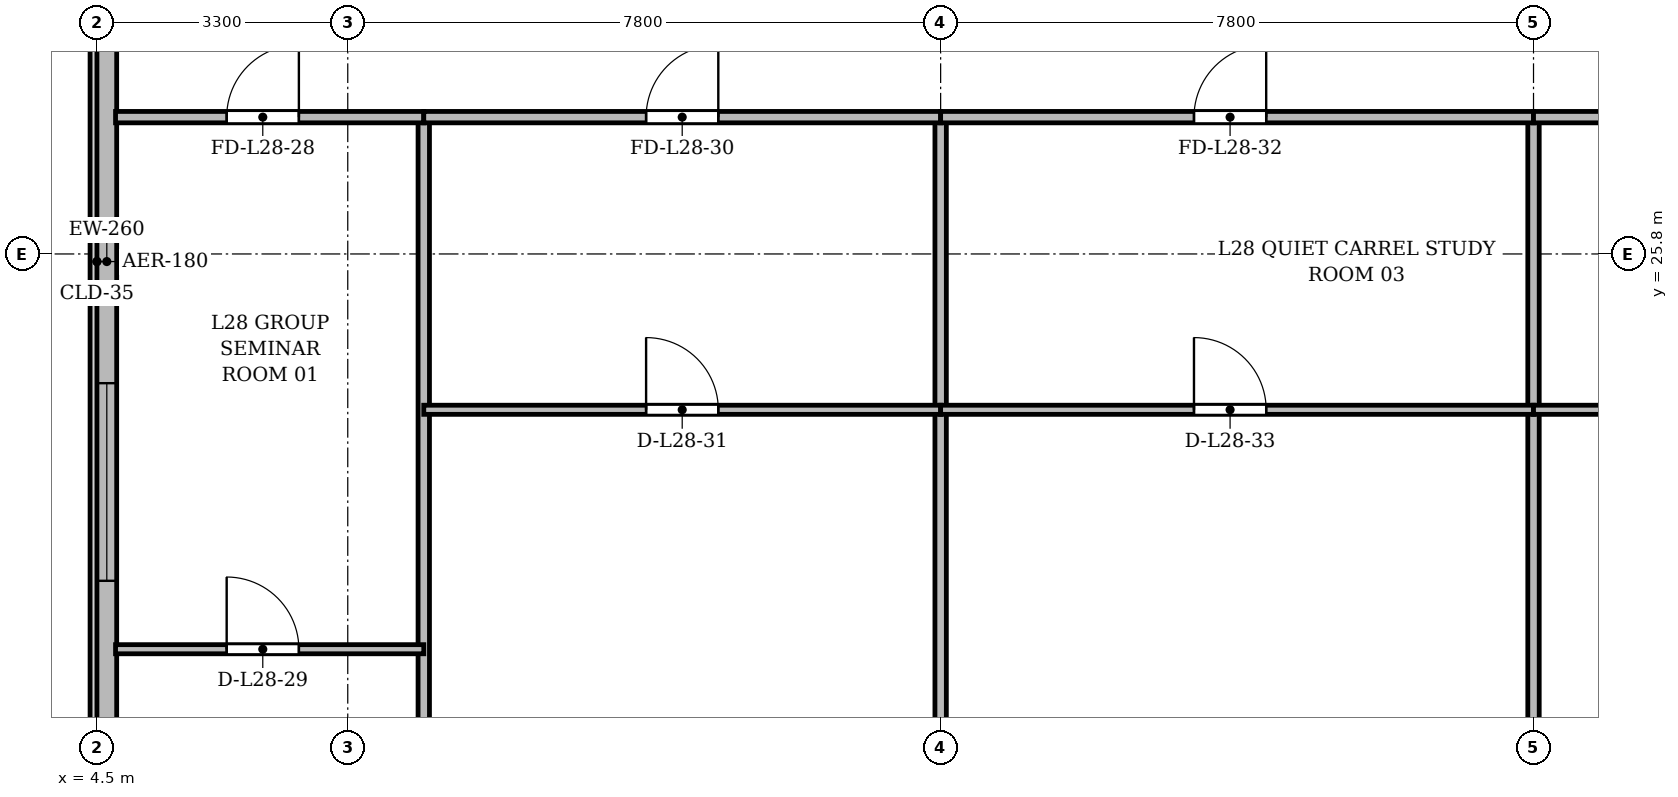
"""IFC4 building model, lengths in metres.
Left out: names, types, materials, properties, quantities, classifications, styles, units other than length and angle.
Written with IfcOpenShell. Run it as: python <this file> out.ifc"""

import sys

from ifc_helpers import new_model, si_unit, direction, frame, frame_2d, origin, place, context, subcontext, project, spatial, rectangle, extrude, source, transform, mapped, element, fill, save


model = new_model("IFC4")
c1 = context("Model", 3, precision=1e-05, world=origin(), true_north=direction((0.0, 1.0)))
c2 = subcontext(c1, "Body", "Model", "MODEL_VIEW")
j1 = project(units=[si_unit("LENGTHUNIT", "METRE"), si_unit("PLANEANGLEUNIT", "RADIAN")], contexts=[c1])
p1 = place(None, origin())
s1 = spatial("IfcSite", under=j1, at=p1, CompositionType="ELEMENT")
p2 = place(p1, origin())
s2 = spatial("IfcBuilding", under=s1, at=p2, CompositionType="ELEMENT")
p3 = place(p2, frame((0.0, 0.0, 110.5)))
s3 = spatial("IfcBuildingStorey", under=s2, at=p3, CompositionType="ELEMENT", Elevation=110.5)
p4 = place(p3, frame((4.63, 5.9, 0.0), z_axis=(0.0, 0.0, 1.0), x_axis=(0.0, 1.0, 0.0)))
e1 = element("IfcWall", 1, at=p4, inside=s3, PredefinedType="SOLIDWALL", context=c2, shape_type="SweptSolid", body=[
    extrude(rectangle(XDim=39.6, YDim=0.26, at=frame_2d((19.8, 0.0))), origin(), (0.0, 0.0, 1.0), 3.34),
])
p5 = place(p4, frame((1.45, 0.0, 0.92)))
e2 = element("IfcOpeningElement", 2, at=p5, cuts=e1, PredefinedType="OPENING", context=c2, shape_type="SweptSolid", body=[
    extrude(rectangle(XDim=1.2, YDim=1.65, at=frame_2d((0.6, 0.825))), frame((0.0, 0.14, 0.0), z_axis=(0.0, -1.0, 0.0), x_axis=(1.0, 0.0, 0.0)), (0.0, 0.0, 1.0), 0.28),
])
p6 = place(p4, frame((4.2, 0.0, 0.92)))
e3 = element("IfcOpeningElement", 3, at=p6, cuts=e1, PredefinedType="OPENING", context=c2, shape_type="SweptSolid", body=[
    extrude(rectangle(XDim=2.6, YDim=1.9, at=frame_2d((1.3, 0.95))), frame((0.0, 0.14, 0.0), z_axis=(0.0, -1.0, 0.0), x_axis=(1.0, 0.0, 0.0)), (0.0, 0.0, 1.0), 0.28),
])
p7 = place(p4, frame((8.4, 0.0, 0.92)))
e4 = element("IfcOpeningElement", 4, at=p7, cuts=e1, PredefinedType="OPENING", context=c2, shape_type="SweptSolid", body=[
    extrude(rectangle(XDim=2.6, YDim=1.9, at=frame_2d((1.3, 0.95))), frame((0.0, 0.14, 0.0), z_axis=(0.0, -1.0, 0.0), x_axis=(1.0, 0.0, 0.0)), (0.0, 0.0, 1.0), 0.28),
])
p8 = place(p4, frame((15.6, 0.0, 0.92)))
e5 = element("IfcOpeningElement", 5, at=p8, cuts=e1, PredefinedType="OPENING", context=c2, shape_type="SweptSolid", body=[
    extrude(rectangle(XDim=2.6, YDim=1.9, at=frame_2d((1.3, 0.95))), frame((0.0, 0.14, 0.0), z_axis=(0.0, -1.0, 0.0), x_axis=(1.0, 0.0, 0.0)), (0.0, 0.0, 1.0), 0.28),
])
p9 = place(p4, frame((29.6, 0.0, 0.92)))
e6 = element("IfcOpeningElement", 6, at=p9, cuts=e1, PredefinedType="OPENING", context=c2, shape_type="SweptSolid", body=[
    extrude(rectangle(XDim=2.6, YDim=1.9, at=frame_2d((1.3, 0.95))), frame((0.0, 0.14, 0.0), z_axis=(0.0, -1.0, 0.0), x_axis=(1.0, 0.0, 0.0)), (0.0, 0.0, 1.0), 0.28),
])
p10 = place(p4, frame((33.9, 0.0, 0.92)))
e7 = element("IfcOpeningElement", 7, at=p10, cuts=e1, PredefinedType="OPENING", context=c2, shape_type="SweptSolid", body=[
    extrude(rectangle(XDim=1.2, YDim=1.65, at=frame_2d((0.6, 0.825))), frame((0.0, 0.14, 0.0), z_axis=(0.0, -1.0, 0.0), x_axis=(1.0, 0.0, 0.0)), (0.0, 0.0, 1.0), 0.28),
])
p11 = place(p4, frame((37.25, 0.0, 0.92)))
e8 = element("IfcOpeningElement", 8, at=p11, cuts=e1, PredefinedType="OPENING", context=c2, shape_type="SweptSolid", body=[
    extrude(rectangle(XDim=1.2, YDim=1.65, at=frame_2d((0.6, 0.825))), frame((0.0, 0.14, 0.0), z_axis=(0.0, -1.0, 0.0), x_axis=(1.0, 0.0, 0.0)), (0.0, 0.0, 1.0), 0.28),
])
for number, where, z_axis, x_axis in (
    (9, (8.8, 3.145, 0.0), (0.0, 0.0, 1.0), (0.0, 1.0, 0.0)),
    (10, (15.6, 3.145, 0.0), (0.0, 0.0, 1.0), (0.0, 1.0, 0.0)),
    (11, (23.4, 3.145, 0.0), (0.0, 0.0, 1.0), (0.0, 1.0, 0.0)),
):
    element("IfcWall", number, at=place(p3, frame(where, z_axis=z_axis, x_axis=x_axis)), inside=s3, PredefinedType="PARTITIONING", context=c2, shape_type="SweptSolid", body=[
        extrude(rectangle(XDim=24.455, YDim=0.15, at=frame_2d((12.228, 0.0))), origin(), (0.0, 0.0, 1.0), 2.84),
    ])
p12 = place(p3, frame((4.745, 27.6, 0.0), z_axis=(0.0, 0.0, 1.0), x_axis=(1.0, 0.0, 0.0)))
e12 = element("IfcWall", 12, at=p12, inside=s3, PredefinedType="PARTITIONING", context=c2, shape_type="SweptSolid", body=[
    extrude(rectangle(XDim=4.055, YDim=0.15, at=frame_2d((2.027, 0.0))), origin(), (0.0, 0.0, 1.0), 2.84),
])
p13 = place(p12, frame((1.462, 0.0, 0.0)))
e13 = element("IfcOpeningElement", 13, at=p13, cuts=e12, PredefinedType="OPENING", context=c2, shape_type="SweptSolid", body=[
    extrude(rectangle(XDim=0.95, YDim=2.15, at=frame_2d((0.475, 1.075))), frame((0.0, 0.085, 0.0), z_axis=(0.0, -1.0, 0.0), x_axis=(1.0, 0.0, 0.0)), (0.0, 0.0, 1.0), 0.17),
])
p14 = place(p3, frame((4.745, 20.6, 0.0), z_axis=(0.0, 0.0, 1.0), x_axis=(1.0, 0.0, 0.0)))
e14 = element("IfcWall", 14, at=p14, inside=s3, PredefinedType="PARTITIONING", context=c2, shape_type="SweptSolid", body=[
    extrude(rectangle(XDim=4.055, YDim=0.12, at=frame_2d((2.027, 0.0))), origin(), (0.0, 0.0, 1.0), 2.84),
])
p15 = place(p14, frame((1.462, 0.0, 0.0)))
e15 = element("IfcOpeningElement", 15, at=p15, cuts=e14, PredefinedType="OPENING", context=c2, shape_type="SweptSolid", body=[
    extrude(rectangle(XDim=0.95, YDim=2.15, at=frame_2d((0.475, 1.075))), frame((0.0, 0.07, 0.0), z_axis=(0.0, -1.0, 0.0), x_axis=(1.0, 0.0, 0.0)), (0.0, 0.0, 1.0), 0.14),
])
p16 = place(p3, frame((8.8, 27.6, 0.0), z_axis=(0.0, 0.0, 1.0), x_axis=(1.0, 0.0, 0.0)))
e16 = element("IfcWall", 16, at=p16, inside=s3, PredefinedType="PARTITIONING", context=c2, shape_type="SweptSolid", body=[
    extrude(rectangle(XDim=6.8, YDim=0.15, at=frame_2d((3.4, 0.0))), origin(), (0.0, 0.0, 1.0), 2.84),
])
p17 = place(p16, frame((2.925, 0.0, 0.0)))
e17 = element("IfcOpeningElement", 17, at=p17, cuts=e16, PredefinedType="OPENING", context=c2, shape_type="SweptSolid", body=[
    extrude(rectangle(XDim=0.95, YDim=2.15, at=frame_2d((0.475, 1.075))), frame((0.0, 0.085, 0.0), z_axis=(0.0, -1.0, 0.0), x_axis=(1.0, 0.0, 0.0)), (0.0, 0.0, 1.0), 0.17),
])
p18 = place(p3, frame((8.8, 23.75, 0.0), z_axis=(0.0, 0.0, 1.0), x_axis=(1.0, 0.0, 0.0)))
e18 = element("IfcWall", 18, at=p18, inside=s3, PredefinedType="PARTITIONING", context=c2, shape_type="SweptSolid", body=[
    extrude(rectangle(XDim=6.8, YDim=0.12, at=frame_2d((3.4, 0.0))), origin(), (0.0, 0.0, 1.0), 2.84),
])
p19 = place(p18, frame((2.925, 0.0, 0.0)))
e19 = element("IfcOpeningElement", 19, at=p19, cuts=e18, PredefinedType="OPENING", context=c2, shape_type="SweptSolid", body=[
    extrude(rectangle(XDim=0.95, YDim=2.15, at=frame_2d((0.475, 1.075))), frame((0.0, 0.07, 0.0), z_axis=(0.0, -1.0, 0.0), x_axis=(1.0, 0.0, 0.0)), (0.0, 0.0, 1.0), 0.14),
])
p20 = place(p3, frame((15.6, 27.6, 0.0), z_axis=(0.0, 0.0, 1.0), x_axis=(1.0, 0.0, 0.0)))
e20 = element("IfcWall", 20, at=p20, inside=s3, PredefinedType="PARTITIONING", context=c2, shape_type="SweptSolid", body=[
    extrude(rectangle(XDim=7.8, YDim=0.15, at=frame_2d((3.9, 0.0))), origin(), (0.0, 0.0, 1.0), 2.84),
])
p21 = place(p20, frame((3.333, 0.0, 0.0)))
e21 = element("IfcOpeningElement", 21, at=p21, cuts=e20, PredefinedType="OPENING", context=c2, shape_type="SweptSolid", body=[
    extrude(rectangle(XDim=0.95, YDim=2.15, at=frame_2d((0.475, 1.075))), frame((0.0, 0.085, 0.0), z_axis=(0.0, -1.0, 0.0), x_axis=(1.0, 0.0, 0.0)), (0.0, 0.0, 1.0), 0.17),
])
p22 = place(p3, frame((15.6, 23.75, 0.0), z_axis=(0.0, 0.0, 1.0), x_axis=(1.0, 0.0, 0.0)))
e22 = element("IfcWall", 22, at=p22, inside=s3, PredefinedType="PARTITIONING", context=c2, shape_type="SweptSolid", body=[
    extrude(rectangle(XDim=7.8, YDim=0.12, at=frame_2d((3.9, 0.0))), origin(), (0.0, 0.0, 1.0), 2.84),
])
p23 = place(p22, frame((3.333, 0.0, 0.0)))
e23 = element("IfcOpeningElement", 23, at=p23, cuts=e22, PredefinedType="OPENING", context=c2, shape_type="SweptSolid", body=[
    extrude(rectangle(XDim=0.95, YDim=2.15, at=frame_2d((0.475, 1.075))), frame((0.0, 0.07, 0.0), z_axis=(0.0, -1.0, 0.0), x_axis=(1.0, 0.0, 0.0)), (0.0, 0.0, 1.0), 0.14),
])
p24 = place(p3, frame((23.4, 27.6, 0.0), z_axis=(0.0, 0.0, 1.0), x_axis=(1.0, 0.0, 0.0)))
e24 = element("IfcWall", 24, at=p24, inside=s3, PredefinedType="PARTITIONING", context=c2, shape_type="SweptSolid", body=[
    extrude(rectangle(XDim=3.8, YDim=0.15, at=frame_2d((1.9, 0.0))), origin(), (0.0, 0.0, 1.0), 2.84),
])
p25 = place(p24, frame((1.33, 0.0, 0.0)))
e25 = element("IfcOpeningElement", 25, at=p25, cuts=e24, PredefinedType="OPENING", context=c2, shape_type="SweptSolid", body=[
    extrude(rectangle(XDim=0.95, YDim=2.15, at=frame_2d((0.475, 1.075))), frame((0.0, 0.085, 0.0), z_axis=(0.0, -1.0, 0.0), x_axis=(1.0, 0.0, 0.0)), (0.0, 0.0, 1.0), 0.17),
])
p26 = place(p3, frame((23.4, 23.75, 0.0), z_axis=(0.0, 0.0, 1.0), x_axis=(1.0, 0.0, 0.0)))
e26 = element("IfcWall", 26, at=p26, inside=s3, PredefinedType="PARTITIONING", context=c2, shape_type="SweptSolid", body=[
    extrude(rectangle(XDim=3.8, YDim=0.12, at=frame_2d((1.9, 0.0))), origin(), (0.0, 0.0, 1.0), 2.84),
])
p27 = place(p26, frame((1.33, 0.0, 0.0)))
e27 = element("IfcOpeningElement", 27, at=p27, cuts=e26, PredefinedType="OPENING", context=c2, shape_type="SweptSolid", body=[
    extrude(rectangle(XDim=0.95, YDim=2.15, at=frame_2d((0.475, 1.075))), frame((0.0, 0.07, 0.0), z_axis=(0.0, -1.0, 0.0), x_axis=(1.0, 0.0, 0.0)), (0.0, 0.0, 1.0), 0.14),
])
m1 = source(origin(), c2, "Body", "SweptSolid", [
    extrude(rectangle(XDim=2.6, YDim=1.9, at=frame_2d((1.3, 0.95))), frame((0.0, 0.03, 0.0), z_axis=(0.0, -1.0, 0.0), x_axis=(1.0, 0.0, 0.0)), (0.0, 0.0, 1.0), 0.06),
])
p28 = place(p8, origin())
e28 = element("IfcWindow", 28, at=p28, inside=s3, PartitioningType="SINGLE_PANEL", PredefinedType="WINDOW", context=c2, shape_type="MappedRepresentation", body=[
    mapped(m1, transform((0.0, 0.0, 0.0), x_axis=(1.0, 0.0, 0.0), y_axis=(0.0, 1.0, 0.0), z_axis=(0.0, 0.0, 1.0), scale=1.0)),
])
fill(e5, e28)
m2 = source(origin(), c2, "Body", "SweptSolid", [
    extrude(rectangle(XDim=0.95, YDim=2.15, at=frame_2d((0.475, 1.075))), frame((0.0, 0.025, 0.0), z_axis=(0.0, -1.0, 0.0), x_axis=(1.0, 0.0, 0.0)), (0.0, 0.0, 1.0), 0.05),
])
p29 = place(p13, origin())
e29 = element("IfcDoor", 29, at=p29, inside=s3, OperationType="SINGLE_SWING_RIGHT", PredefinedType="DOOR", context=c2, shape_type="MappedRepresentation", body=[
    mapped(m2, transform((0.0, 0.0, 0.0), x_axis=(1.0, 0.0, 0.0), y_axis=(0.0, 1.0, 0.0), z_axis=(0.0, 0.0, 1.0), scale=1.0)),
])
fill(e13, e29)
p30 = place(p15, origin())
e30 = element("IfcDoor", 30, at=p30, inside=s3, OperationType="SINGLE_SWING_LEFT", PredefinedType="DOOR", context=c2, shape_type="MappedRepresentation", body=[
    mapped(m2, transform((0.0, 0.0, 0.0), x_axis=(1.0, 0.0, 0.0), y_axis=(0.0, 1.0, 0.0), z_axis=(0.0, 0.0, 1.0), scale=1.0)),
])
fill(e15, e30)
p31 = place(p17, origin())
e31 = element("IfcDoor", 31, at=p31, inside=s3, OperationType="SINGLE_SWING_RIGHT", PredefinedType="DOOR", context=c2, shape_type="MappedRepresentation", body=[
    mapped(m2, transform((0.0, 0.0, 0.0), x_axis=(1.0, 0.0, 0.0), y_axis=(0.0, 1.0, 0.0), z_axis=(0.0, 0.0, 1.0), scale=1.0)),
])
fill(e17, e31)
p32 = place(p19, origin())
e32 = element("IfcDoor", 32, at=p32, inside=s3, OperationType="SINGLE_SWING_LEFT", PredefinedType="DOOR", context=c2, shape_type="MappedRepresentation", body=[
    mapped(m2, transform((0.0, 0.0, 0.0), x_axis=(1.0, 0.0, 0.0), y_axis=(0.0, 1.0, 0.0), z_axis=(0.0, 0.0, 1.0), scale=1.0)),
])
fill(e19, e32)
p33 = place(p21, origin())
e33 = element("IfcDoor", 33, at=p33, inside=s3, OperationType="SINGLE_SWING_RIGHT", PredefinedType="DOOR", context=c2, shape_type="MappedRepresentation", body=[
    mapped(m2, transform((0.0, 0.0, 0.0), x_axis=(1.0, 0.0, 0.0), y_axis=(0.0, 1.0, 0.0), z_axis=(0.0, 0.0, 1.0), scale=1.0)),
])
fill(e21, e33)
p34 = place(p23, origin())
e34 = element("IfcDoor", 34, at=p34, inside=s3, OperationType="SINGLE_SWING_LEFT", PredefinedType="DOOR", context=c2, shape_type="MappedRepresentation", body=[
    mapped(m2, transform((0.0, 0.0, 0.0), x_axis=(1.0, 0.0, 0.0), y_axis=(0.0, 1.0, 0.0), z_axis=(0.0, 0.0, 1.0), scale=1.0)),
])
fill(e23, e34)
save(model, sys.argv[1])
